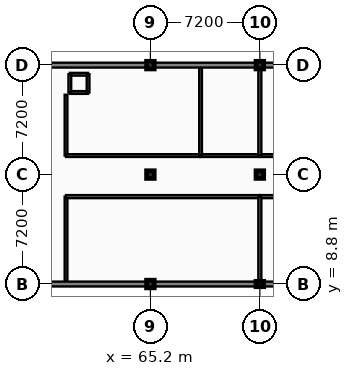
"""IFC4 building model, lengths in metres.
Left out: names, types, materials, properties, quantities, classifications, styles, units other than length and angle.
Written with IfcOpenShell. Run it as: python <this file> out.ifc"""

import sys

from ifc_helpers import new_model, si_unit, direction, frame, frame_2d, origin, origin_2d, place, context, subcontext, project, spatial, rectangle, extrude, element, fill, save


model = new_model("IFC4")
c1 = context("Model", 3, precision=1e-05, world=origin(), true_north=direction((0.0, 1.0)))
c2 = subcontext(c1, "Body", "Model", "MODEL_VIEW")
j1 = project(units=[si_unit("LENGTHUNIT", "METRE"), si_unit("PLANEANGLEUNIT", "RADIAN")], contexts=[c1])
p1 = place(None, origin())
s1 = spatial("IfcSite", under=j1, at=p1, CompositionType="ELEMENT")
p2 = place(p1, origin())
s2 = spatial("IfcBuilding", under=s1, at=p2, CompositionType="ELEMENT")
p3 = place(p2, origin())
s3 = spatial("IfcBuildingStorey", under=s2, at=p3, CompositionType="ELEMENT", Elevation=0.0)
for number, where, z_axis, x_axis in (
    (1, (65.2, 8.8, 0.0), (0.0, 0.0, 1.0), (1.0, 0.0, 0.0)),
    (2, (65.2, 16.0, 0.0), (0.0, 0.0, 1.0), (1.0, 0.0, 0.0)),
    (3, (65.2, 23.2, 0.0), (0.0, 0.0, 1.0), (1.0, 0.0, 0.0)),
):
    element("IfcColumn", number, at=place(p3, frame(where, z_axis=z_axis, x_axis=x_axis)), inside=s3, PredefinedType="COLUMN", context=c2, shape_type="SweptSolid", body=[
        extrude(rectangle(XDim=0.5, YDim=0.5, at=origin_2d()), origin(), (0.0, 0.0, 1.0), 5.4),
    ])
p4 = place(p3, frame((72.4, 8.8, 0.0), z_axis=(0.0, 0.0, 1.0), x_axis=(1.0, 0.0, 0.0)))
e4 = element("IfcColumn", 4, at=p4, inside=s3, PredefinedType="PILASTER", context=c2, shape_type="SweptSolid", body=[
    extrude(rectangle(XDim=0.5, YDim=0.35, at=origin_2d()), origin(), (0.0, 0.0, 1.0), 5.4),
])
for number, where, z_axis, x_axis in (
    (5, (72.4, 16.0, 0.0), (0.0, 0.0, 1.0), (1.0, 0.0, 0.0)),
    (6, (72.4, 23.2, 0.0), (0.0, 0.0, 1.0), (1.0, 0.0, 0.0)),
):
    element("IfcColumn", number, at=place(p3, frame(where, z_axis=z_axis, x_axis=x_axis)), inside=s3, PredefinedType="COLUMN", context=c2, shape_type="SweptSolid", body=[
        extrude(rectangle(XDim=0.5, YDim=0.5, at=origin_2d()), origin(), (0.0, 0.0, 1.0), 5.4),
    ])
p5 = place(p3, frame((59.65, 8.95, 0.0), z_axis=(0.0, 0.0, 1.0), x_axis=(0.0, 1.0, 0.0)))
e7 = element("IfcWall", 7, at=p5, inside=s3, PredefinedType="PARTITIONING", context=c2, shape_type="SweptSolid", body=[
    extrude(rectangle(XDim=5.6, YDim=0.18, at=frame_2d((2.8, 0.0))), origin(), (0.0, 0.0, 1.0), 4.64),
])
p6 = place(p5, frame((2.2, 0.0, -0.01)))
e8 = element("IfcOpeningElement", 8, at=p6, cuts=e7, PredefinedType="OPENING", context=c2, shape_type="SweptSolid", body=[
    extrude(rectangle(XDim=1.2, YDim=2.21, at=frame_2d((0.6, 1.105))), frame((0.0, 0.1, 0.0), z_axis=(0.0, -1.0, 0.0), x_axis=(1.0, 0.0, 0.0)), (0.0, 0.0, 1.0), 0.2),
])
p7 = place(p3, frame((59.65, 17.25, 0.0), z_axis=(0.0, 0.0, 1.0), x_axis=(0.0, 1.0, 0.0)))
e9 = element("IfcWall", 9, at=p7, inside=s3, PredefinedType="PARTITIONING", context=c2, shape_type="SweptSolid", body=[
    extrude(rectangle(XDim=4.0, YDim=0.18, at=frame_2d((2.0, 0.0))), origin(), (0.0, 0.0, 1.0), 5.04),
])
p8 = place(p7, frame((1.5, 0.0, -0.01)))
e10 = element("IfcOpeningElement", 10, at=p8, cuts=e9, PredefinedType="OPENING", context=c2, shape_type="SweptSolid", body=[
    extrude(rectangle(XDim=1.0, YDim=2.16, at=frame_2d((0.5, 1.08))), frame((0.0, 0.1, 0.0), z_axis=(0.0, -1.0, 0.0), x_axis=(1.0, 0.0, 0.0)), (0.0, 0.0, 1.0), 0.2),
])
p9 = place(p3, frame((59.65, 14.55, 0.0), z_axis=(0.0, 0.0, 1.0), x_axis=(1.0, 0.0, 0.0)))
e11 = element("IfcWall", 11, at=p9, inside=s3, PredefinedType="PARTITIONING", context=c2, shape_type="SweptSolid", body=[
    extrude(rectangle(XDim=12.75, YDim=0.2, at=frame_2d((6.375, 0.0))), origin(), (0.0, 0.0, 1.0), 4.39),
])
p10 = place(p9, frame((2.079, 0.0, -0.01)))
e12 = element("IfcOpeningElement", 12, at=p10, cuts=e11, PredefinedType="OPENING", context=c2, shape_type="SweptSolid", body=[
    extrude(rectangle(XDim=1.2, YDim=2.21, at=frame_2d((0.6, 1.105))), frame((0.0, 0.11, 0.0), z_axis=(0.0, -1.0, 0.0), x_axis=(1.0, 0.0, 0.0)), (0.0, 0.0, 1.0), 0.22),
])
p11 = place(p3, frame((72.4, 14.55, 0.0), z_axis=(0.0, 0.0, 1.0), x_axis=(1.0, 0.0, 0.0)))
e13 = element("IfcWall", 13, at=p11, inside=s3, PredefinedType="PARTITIONING", context=c2, shape_type="SweptSolid", body=[
    extrude(rectangle(XDim=14.55, YDim=0.2, at=frame_2d((7.275, 0.0))), origin(), (0.0, 0.0, 1.0), 4.39),
])
p12 = place(p11, frame((5.34, 0.0, -0.01)))
e14 = element("IfcOpeningElement", 14, at=p12, cuts=e13, PredefinedType="OPENING", context=c2, shape_type="SweptSolid", body=[
    extrude(rectangle(XDim=1.2, YDim=2.21, at=frame_2d((0.6, 1.105))), frame((0.0, 0.11, 0.0), z_axis=(0.0, -1.0, 0.0), x_axis=(1.0, 0.0, 0.0)), (0.0, 0.0, 1.0), 0.22),
])
p13 = place(p3, frame((59.65, 17.25, 0.0), z_axis=(0.0, 0.0, 1.0), x_axis=(1.0, 0.0, 0.0)))
e15 = element("IfcWall", 15, at=p13, inside=s3, PredefinedType="PARTITIONING", context=c2, shape_type="SweptSolid", body=[
    extrude(rectangle(XDim=8.85, YDim=0.18, at=frame_2d((4.425, 0.0))), origin(), (0.0, 0.0, 1.0), 4.39),
])
p14 = place(p13, frame((3.533, 0.0, -0.01)))
e16 = element("IfcOpeningElement", 16, at=p14, cuts=e15, PredefinedType="OPENING", context=c2, shape_type="SweptSolid", body=[
    extrude(rectangle(XDim=1.0, YDim=2.16, at=frame_2d((0.5, 1.08))), frame((0.0, 0.1, 0.0), z_axis=(0.0, -1.0, 0.0), x_axis=(1.0, 0.0, 0.0)), (0.0, 0.0, 1.0), 0.2),
])
p15 = place(p3, frame((68.5, 17.25, 0.0), z_axis=(0.0, 0.0, 1.0), x_axis=(1.0, 0.0, 0.0)))
e17 = element("IfcWall", 17, at=p15, inside=s3, PredefinedType="PARTITIONING", context=c2, shape_type="SweptSolid", body=[
    extrude(rectangle(XDim=3.9, YDim=0.18, at=frame_2d((1.95, 0.0))), origin(), (0.0, 0.0, 1.0), 4.39),
])
p16 = place(p15, frame((1.45, 0.0, -0.01)))
e18 = element("IfcOpeningElement", 18, at=p16, cuts=e17, PredefinedType="OPENING", context=c2, shape_type="SweptSolid", body=[
    extrude(rectangle(XDim=1.0, YDim=2.16, at=frame_2d((0.5, 1.08))), frame((0.0, 0.1, 0.0), z_axis=(0.0, -1.0, 0.0), x_axis=(1.0, 0.0, 0.0)), (0.0, 0.0, 1.0), 0.2),
])
p17 = place(p3, frame((72.4, 17.25, 0.0), z_axis=(0.0, 0.0, 1.0), x_axis=(1.0, 0.0, 0.0)))
e19 = element("IfcWall", 19, at=p17, inside=s3, PredefinedType="PARTITIONING", context=c2, shape_type="SweptSolid", body=[
    extrude(rectangle(XDim=14.55, YDim=0.18, at=frame_2d((7.275, 0.0))), origin(), (0.0, 0.0, 1.0), 4.39),
])
p18 = place(p17, frame((5.34, 0.0, -0.01)))
e20 = element("IfcOpeningElement", 20, at=p18, cuts=e19, PredefinedType="OPENING", context=c2, shape_type="SweptSolid", body=[
    extrude(rectangle(XDim=1.2, YDim=2.21, at=frame_2d((0.6, 1.105))), frame((0.0, 0.1, 0.0), z_axis=(0.0, -1.0, 0.0), x_axis=(1.0, 0.0, 0.0)), (0.0, 0.0, 1.0), 0.2),
])
p19 = place(p3, frame((68.5, 17.25, 0.0), z_axis=(0.0, 0.0, 1.0), x_axis=(0.0, 1.0, 0.0)))
e21 = element("IfcWall", 21, at=p19, inside=s3, PredefinedType="PARTITIONING", context=c2, shape_type="SweptSolid", body=[
    extrude(rectangle(XDim=5.8, YDim=0.18, at=frame_2d((2.9, 0.0))), origin(), (0.0, 0.0, 1.0), 4.64),
])
p20 = place(p3, frame((72.4, 8.95, 0.0), z_axis=(0.0, 0.0, 1.0), x_axis=(0.0, 1.0, 0.0)))
e22 = element("IfcWall", 22, at=p20, inside=s3, PredefinedType="PARTITIONING", context=c2, shape_type="SweptSolid", body=[
    extrude(rectangle(XDim=5.6, YDim=0.2, at=frame_2d((2.8, 0.0))), origin(), (0.0, 0.0, 1.0), 4.39),
])
p21 = place(p3, frame((72.4, 17.25, 0.0), z_axis=(0.0, 0.0, 1.0), x_axis=(0.0, 1.0, 0.0)))
e23 = element("IfcWall", 23, at=p21, inside=s3, PredefinedType="PARTITIONING", context=c2, shape_type="SweptSolid", body=[
    extrude(rectangle(XDim=5.8, YDim=0.2, at=frame_2d((2.9, 0.0))), origin(), (0.0, 0.0, 1.0), 4.39),
])
p22 = place(p3, frame((58.0, 8.8, 0.0), z_axis=(0.0, 0.0, 1.0), x_axis=(1.0, 0.0, 0.0)))
e24 = element("IfcWall", 24, at=p22, inside=s3, PredefinedType="SOLIDWALL", context=c2, shape_type="SweptSolid", body=[
    extrude(rectangle(XDim=7.2, YDim=0.32, at=frame_2d((3.6, 0.0))), origin(), (0.0, 0.0, 1.0), 4.39),
])
p23 = place(p22, frame((1.86, 0.0, 0.9)))
e25 = element("IfcOpeningElement", 25, at=p23, cuts=e24, PredefinedType="OPENING", context=c2, shape_type="SweptSolid", body=[
    extrude(rectangle(XDim=1.8, YDim=2.2, at=frame_2d((0.9, 1.1))), frame((0.0, 0.17, 0.0), z_axis=(0.0, -1.0, 0.0), x_axis=(1.0, 0.0, 0.0)), (0.0, 0.0, 1.0), 0.34),
])
p24 = place(p22, frame((4.86, 0.0, 0.9)))
e26 = element("IfcOpeningElement", 26, at=p24, cuts=e24, PredefinedType="OPENING", context=c2, shape_type="SweptSolid", body=[
    extrude(rectangle(XDim=1.8, YDim=2.2, at=frame_2d((0.9, 1.1))), frame((0.0, 0.17, 0.0), z_axis=(0.0, -1.0, 0.0), x_axis=(1.0, 0.0, 0.0)), (0.0, 0.0, 1.0), 0.34),
])
p25 = place(p3, frame((65.2, 8.8, 0.0), z_axis=(0.0, 0.0, 1.0), x_axis=(1.0, 0.0, 0.0)))
e27 = element("IfcWall", 27, at=p25, inside=s3, PredefinedType="SOLIDWALL", context=c2, shape_type="SweptSolid", body=[
    extrude(rectangle(XDim=7.2, YDim=0.32, at=frame_2d((3.6, 0.0))), origin(), (0.0, 0.0, 1.0), 4.39),
])
p26 = place(p25, frame((0.46, 0.0, 0.9)))
e28 = element("IfcOpeningElement", 28, at=p26, cuts=e27, PredefinedType="OPENING", context=c2, shape_type="SweptSolid", body=[
    extrude(rectangle(XDim=1.8, YDim=2.2, at=frame_2d((0.9, 1.1))), frame((0.0, 0.17, 0.0), z_axis=(0.0, -1.0, 0.0), x_axis=(1.0, 0.0, 0.0)), (0.0, 0.0, 1.0), 0.34),
])
p27 = place(p25, frame((4.86, 0.0, 0.9)))
e29 = element("IfcOpeningElement", 29, at=p27, cuts=e27, PredefinedType="OPENING", context=c2, shape_type="SweptSolid", body=[
    extrude(rectangle(XDim=1.8, YDim=2.2, at=frame_2d((0.9, 1.1))), frame((0.0, 0.17, 0.0), z_axis=(0.0, -1.0, 0.0), x_axis=(1.0, 0.0, 0.0)), (0.0, 0.0, 1.0), 0.34),
])
p28 = place(p3, frame((72.4, 8.8, 0.0), z_axis=(0.0, 0.0, 1.0), x_axis=(1.0, 0.0, 0.0)))
e30 = element("IfcWall", 30, at=p28, inside=s3, PredefinedType="SOLIDWALL", context=c2, shape_type="SweptSolid", body=[
    extrude(rectangle(XDim=7.2, YDim=0.32, at=frame_2d((3.6, 0.0))), origin(), (0.0, 0.0, 1.0), 4.39),
])
p29 = place(p28, frame((0.46, 0.0, 0.9)))
e31 = element("IfcOpeningElement", 31, at=p29, cuts=e30, PredefinedType="OPENING", context=c2, shape_type="SweptSolid", body=[
    extrude(rectangle(XDim=1.8, YDim=2.2, at=frame_2d((0.9, 1.1))), frame((0.0, 0.17, 0.0), z_axis=(0.0, -1.0, 0.0), x_axis=(1.0, 0.0, 0.0)), (0.0, 0.0, 1.0), 0.34),
])
p30 = place(p28, frame((4.86, 0.0, 0.9)))
e32 = element("IfcOpeningElement", 32, at=p30, cuts=e30, PredefinedType="OPENING", context=c2, shape_type="SweptSolid", body=[
    extrude(rectangle(XDim=1.8, YDim=2.2, at=frame_2d((0.9, 1.1))), frame((0.0, 0.17, 0.0), z_axis=(0.0, -1.0, 0.0), x_axis=(1.0, 0.0, 0.0)), (0.0, 0.0, 1.0), 0.34),
])
p31 = place(p3, frame((65.2, 23.2, 0.0), z_axis=(0.0, 0.0, 1.0), x_axis=(-1.0, 0.0, 0.0)))
e33 = element("IfcWall", 33, at=p31, inside=s3, PredefinedType="SOLIDWALL", context=c2, shape_type="SweptSolid", body=[
    extrude(rectangle(XDim=7.2, YDim=0.32, at=frame_2d((3.6, 0.0))), origin(), (0.0, 0.0, 1.0), 4.39),
])
p32 = place(p31, frame((0.46, 0.0, 0.9)))
e34 = element("IfcOpeningElement", 34, at=p32, cuts=e33, PredefinedType="OPENING", context=c2, shape_type="SweptSolid", body=[
    extrude(rectangle(XDim=1.8, YDim=2.2, at=frame_2d((0.9, 1.1))), frame((0.0, 0.17, 0.0), z_axis=(0.0, -1.0, 0.0), x_axis=(1.0, 0.0, 0.0)), (0.0, 0.0, 1.0), 0.34),
])
p33 = place(p31, frame((4.86, 0.0, 0.9)))
e35 = element("IfcOpeningElement", 35, at=p33, cuts=e33, PredefinedType="OPENING", context=c2, shape_type="SweptSolid", body=[
    extrude(rectangle(XDim=1.8, YDim=2.2, at=frame_2d((0.9, 1.1))), frame((0.0, 0.17, 0.0), z_axis=(0.0, -1.0, 0.0), x_axis=(1.0, 0.0, 0.0)), (0.0, 0.0, 1.0), 0.34),
])
p34 = place(p3, frame((72.4, 23.2, 0.0), z_axis=(0.0, 0.0, 1.0), x_axis=(-1.0, 0.0, 0.0)))
e36 = element("IfcWall", 36, at=p34, inside=s3, PredefinedType="SOLIDWALL", context=c2, shape_type="SweptSolid", body=[
    extrude(rectangle(XDim=7.2, YDim=0.32, at=frame_2d((3.6, 0.0))), origin(), (0.0, 0.0, 1.0), 4.39),
])
p35 = place(p34, frame((0.46, 0.0, 0.9)))
e37 = element("IfcOpeningElement", 37, at=p35, cuts=e36, PredefinedType="OPENING", context=c2, shape_type="SweptSolid", body=[
    extrude(rectangle(XDim=1.8, YDim=2.2, at=frame_2d((0.9, 1.1))), frame((0.0, 0.17, 0.0), z_axis=(0.0, -1.0, 0.0), x_axis=(1.0, 0.0, 0.0)), (0.0, 0.0, 1.0), 0.34),
])
p36 = place(p34, frame((4.86, 0.0, 0.9)))
e38 = element("IfcOpeningElement", 38, at=p36, cuts=e36, PredefinedType="OPENING", context=c2, shape_type="SweptSolid", body=[
    extrude(rectangle(XDim=1.8, YDim=2.2, at=frame_2d((0.9, 1.1))), frame((0.0, 0.17, 0.0), z_axis=(0.0, -1.0, 0.0), x_axis=(1.0, 0.0, 0.0)), (0.0, 0.0, 1.0), 0.34),
])
p37 = place(p3, frame((79.6, 23.2, 0.0), z_axis=(0.0, 0.0, 1.0), x_axis=(-1.0, 0.0, 0.0)))
e39 = element("IfcWall", 39, at=p37, inside=s3, PredefinedType="SOLIDWALL", context=c2, shape_type="SweptSolid", body=[
    extrude(rectangle(XDim=7.2, YDim=0.32, at=frame_2d((3.6, 0.0))), origin(), (0.0, 0.0, 1.0), 4.39),
])
p38 = place(p37, frame((2.6, 0.0, -0.01)))
e40 = element("IfcOpeningElement", 40, at=p38, cuts=e39, PredefinedType="OPENING", context=c2, shape_type="SweptSolid", body=[
    extrude(rectangle(XDim=2.0, YDim=2.41, at=frame_2d((1.0, 1.205))), frame((0.0, 0.17, 0.0), z_axis=(0.0, -1.0, 0.0), x_axis=(1.0, 0.0, 0.0)), (0.0, 0.0, 1.0), 0.34),
])
for number, where, z_axis, x_axis in (
    (41, (59.9, 21.4, 0.0), (0.0, 0.0, 1.0), (1.0, 0.0, 0.0)),
    (42, (61.1, 21.4, 0.0), (0.0, 0.0, 1.0), (0.0, 1.0, 0.0)),
    (43, (61.1, 22.6, 0.0), (0.0, 0.0, 1.0), (-1.0, 0.0, 0.0)),
):
    element("IfcWall", number, at=place(p3, frame(where, z_axis=z_axis, x_axis=x_axis)), inside=s3, PredefinedType="SOLIDWALL", context=c2, shape_type="SweptSolid", body=[
        extrude(rectangle(XDim=1.2, YDim=0.18, at=frame_2d((0.6, 0.0))), origin(), (0.0, 0.0, 1.0), 5.07),
    ])
p39 = place(p3, frame((59.9, 22.6, 0.0), z_axis=(0.0, 0.0, 1.0), x_axis=(0.0, -1.0, 0.0)))
e44 = element("IfcWall", 44, at=p39, inside=s3, PredefinedType="SOLIDWALL", context=c2, shape_type="SweptSolid", body=[
    extrude(rectangle(XDim=1.2, YDim=0.18, at=frame_2d((0.6, 0.0))), origin(), (0.0, 0.0, 1.0), 5.07),
])
p40 = place(p39, frame((0.2, 0.0, -0.01)))
e45 = element("IfcOpeningElement", 45, at=p40, cuts=e44, PredefinedType="OPENING", context=c2, shape_type="SweptSolid", body=[
    extrude(rectangle(XDim=0.8, YDim=2.06, at=frame_2d((0.4, 1.03))), frame((0.0, 0.1, 0.0), z_axis=(0.0, -1.0, 0.0), x_axis=(1.0, 0.0, 0.0)), (0.0, 0.0, 1.0), 0.2),
])
p41 = place(p6, frame((0.0, 0.0, 0.01)))
e46 = element("IfcDoor", 46, at=p41, inside=s3, OperationType="SINGLE_SWING_LEFT", PredefinedType="DOOR", context=c2, shape_type="SweptSolid", body=[
    extrude(rectangle(XDim=1.2, YDim=2.2, at=frame_2d((0.6, 1.1))), frame((0.0, 0.025, 0.0), z_axis=(0.0, -1.0, 0.0), x_axis=(1.0, 0.0, 0.0)), (0.0, 0.0, 1.0), 0.05),
])
fill(e8, e46)
p42 = place(p8, frame((0.0, 0.0, 0.01)))
e47 = element("IfcDoor", 47, at=p42, inside=s3, OperationType="SINGLE_SWING_RIGHT", PredefinedType="DOOR", context=c2, shape_type="SweptSolid", body=[
    extrude(rectangle(XDim=1.0, YDim=2.15, at=frame_2d((0.5, 1.075))), frame((0.0, 0.025, 0.0), z_axis=(0.0, -1.0, 0.0), x_axis=(1.0, 0.0, 0.0)), (0.0, 0.0, 1.0), 0.05),
])
fill(e10, e47)
p43 = place(p10, frame((1.2, 0.0, 0.01), z_axis=(0.0, 0.0, 1.0), x_axis=(-1.0, 0.0, 0.0)))
e48 = element("IfcDoor", 48, at=p43, inside=s3, OperationType="SINGLE_SWING_LEFT", PredefinedType="DOOR", context=c2, shape_type="SweptSolid", body=[
    extrude(rectangle(XDim=1.2, YDim=2.2, at=frame_2d((0.6, 1.1))), frame((0.0, 0.025, 0.0), z_axis=(0.0, -1.0, 0.0), x_axis=(1.0, 0.0, 0.0)), (0.0, 0.0, 1.0), 0.05),
])
fill(e12, e48)
p44 = place(p14, frame((0.0, 0.0, 0.01)))
e49 = element("IfcDoor", 49, at=p44, inside=s3, OperationType="SINGLE_SWING_LEFT", PredefinedType="DOOR", context=c2, shape_type="SweptSolid", body=[
    extrude(rectangle(XDim=1.0, YDim=2.15, at=frame_2d((0.5, 1.075))), frame((0.0, 0.025, 0.0), z_axis=(0.0, -1.0, 0.0), x_axis=(1.0, 0.0, 0.0)), (0.0, 0.0, 1.0), 0.05),
])
fill(e16, e49)
p45 = place(p16, frame((1.0, 0.0, 0.01), z_axis=(0.0, 0.0, 1.0), x_axis=(-1.0, 0.0, 0.0)))
e50 = element("IfcDoor", 50, at=p45, inside=s3, OperationType="SINGLE_SWING_RIGHT", PredefinedType="DOOR", context=c2, shape_type="SweptSolid", body=[
    extrude(rectangle(XDim=1.0, YDim=2.15, at=frame_2d((0.5, 1.075))), frame((0.0, 0.025, 0.0), z_axis=(0.0, -1.0, 0.0), x_axis=(1.0, 0.0, 0.0)), (0.0, 0.0, 1.0), 0.05),
])
fill(e18, e50)
p46 = place(p23, origin())
e51 = element("IfcWindow", 51, at=p46, inside=s3, PartitioningType="DOUBLE_PANEL_VERTICAL", PredefinedType="WINDOW", context=c2, shape_type="SweptSolid", body=[
    extrude(rectangle(XDim=1.8, YDim=2.2, at=frame_2d((0.9, 1.1))), frame((0.0, 0.03, 0.0), z_axis=(0.0, -1.0, 0.0), x_axis=(1.0, 0.0, 0.0)), (0.0, 0.0, 1.0), 0.06),
])
fill(e25, e51)
p47 = place(p24, origin())
e52 = element("IfcWindow", 52, at=p47, inside=s3, PartitioningType="DOUBLE_PANEL_VERTICAL", PredefinedType="WINDOW", context=c2, shape_type="SweptSolid", body=[
    extrude(rectangle(XDim=1.8, YDim=2.2, at=frame_2d((0.9, 1.1))), frame((0.0, 0.03, 0.0), z_axis=(0.0, -1.0, 0.0), x_axis=(1.0, 0.0, 0.0)), (0.0, 0.0, 1.0), 0.06),
])
fill(e26, e52)
p48 = place(p26, origin())
e53 = element("IfcWindow", 53, at=p48, inside=s3, PartitioningType="DOUBLE_PANEL_VERTICAL", PredefinedType="WINDOW", context=c2, shape_type="SweptSolid", body=[
    extrude(rectangle(XDim=1.8, YDim=2.2, at=frame_2d((0.9, 1.1))), frame((0.0, 0.03, 0.0), z_axis=(0.0, -1.0, 0.0), x_axis=(1.0, 0.0, 0.0)), (0.0, 0.0, 1.0), 0.06),
])
fill(e28, e53)
p49 = place(p27, origin())
e54 = element("IfcWindow", 54, at=p49, inside=s3, PartitioningType="DOUBLE_PANEL_VERTICAL", PredefinedType="WINDOW", context=c2, shape_type="SweptSolid", body=[
    extrude(rectangle(XDim=1.8, YDim=2.2, at=frame_2d((0.9, 1.1))), frame((0.0, 0.03, 0.0), z_axis=(0.0, -1.0, 0.0), x_axis=(1.0, 0.0, 0.0)), (0.0, 0.0, 1.0), 0.06),
])
fill(e29, e54)
p50 = place(p29, origin())
e55 = element("IfcWindow", 55, at=p50, inside=s3, PartitioningType="DOUBLE_PANEL_VERTICAL", PredefinedType="WINDOW", context=c2, shape_type="SweptSolid", body=[
    extrude(rectangle(XDim=1.8, YDim=2.2, at=frame_2d((0.9, 1.1))), frame((0.0, 0.03, 0.0), z_axis=(0.0, -1.0, 0.0), x_axis=(1.0, 0.0, 0.0)), (0.0, 0.0, 1.0), 0.06),
])
fill(e31, e55)
p51 = place(p32, origin())
e56 = element("IfcWindow", 56, at=p51, inside=s3, PartitioningType="DOUBLE_PANEL_VERTICAL", PredefinedType="WINDOW", context=c2, shape_type="SweptSolid", body=[
    extrude(rectangle(XDim=1.8, YDim=2.2, at=frame_2d((0.9, 1.1))), frame((0.0, 0.03, 0.0), z_axis=(0.0, -1.0, 0.0), x_axis=(1.0, 0.0, 0.0)), (0.0, 0.0, 1.0), 0.06),
])
fill(e34, e56)
p52 = place(p33, origin())
e57 = element("IfcWindow", 57, at=p52, inside=s3, PartitioningType="DOUBLE_PANEL_VERTICAL", PredefinedType="WINDOW", context=c2, shape_type="SweptSolid", body=[
    extrude(rectangle(XDim=1.8, YDim=2.2, at=frame_2d((0.9, 1.1))), frame((0.0, 0.03, 0.0), z_axis=(0.0, -1.0, 0.0), x_axis=(1.0, 0.0, 0.0)), (0.0, 0.0, 1.0), 0.06),
])
fill(e35, e57)
p53 = place(p35, origin())
e58 = element("IfcWindow", 58, at=p53, inside=s3, PartitioningType="DOUBLE_PANEL_VERTICAL", PredefinedType="WINDOW", context=c2, shape_type="SweptSolid", body=[
    extrude(rectangle(XDim=1.8, YDim=2.2, at=frame_2d((0.9, 1.1))), frame((0.0, 0.03, 0.0), z_axis=(0.0, -1.0, 0.0), x_axis=(1.0, 0.0, 0.0)), (0.0, 0.0, 1.0), 0.06),
])
fill(e37, e58)
p54 = place(p36, origin())
e59 = element("IfcWindow", 59, at=p54, inside=s3, PartitioningType="DOUBLE_PANEL_VERTICAL", PredefinedType="WINDOW", context=c2, shape_type="SweptSolid", body=[
    extrude(rectangle(XDim=1.8, YDim=2.2, at=frame_2d((0.9, 1.1))), frame((0.0, 0.03, 0.0), z_axis=(0.0, -1.0, 0.0), x_axis=(1.0, 0.0, 0.0)), (0.0, 0.0, 1.0), 0.06),
])
fill(e38, e59)
p55 = place(p40, frame((0.0, 0.0, 0.01)))
e60 = element("IfcDoor", 60, at=p55, inside=s3, OperationType="SINGLE_SWING_RIGHT", PredefinedType="DOOR", context=c2, shape_type="SweptSolid", body=[
    extrude(rectangle(XDim=0.8, YDim=2.05, at=frame_2d((0.4, 1.025))), frame((0.0, 0.025, 0.0), z_axis=(0.0, -1.0, 0.0), x_axis=(1.0, 0.0, 0.0)), (0.0, 0.0, 1.0), 0.05),
])
fill(e45, e60)
save(model, sys.argv[1])
